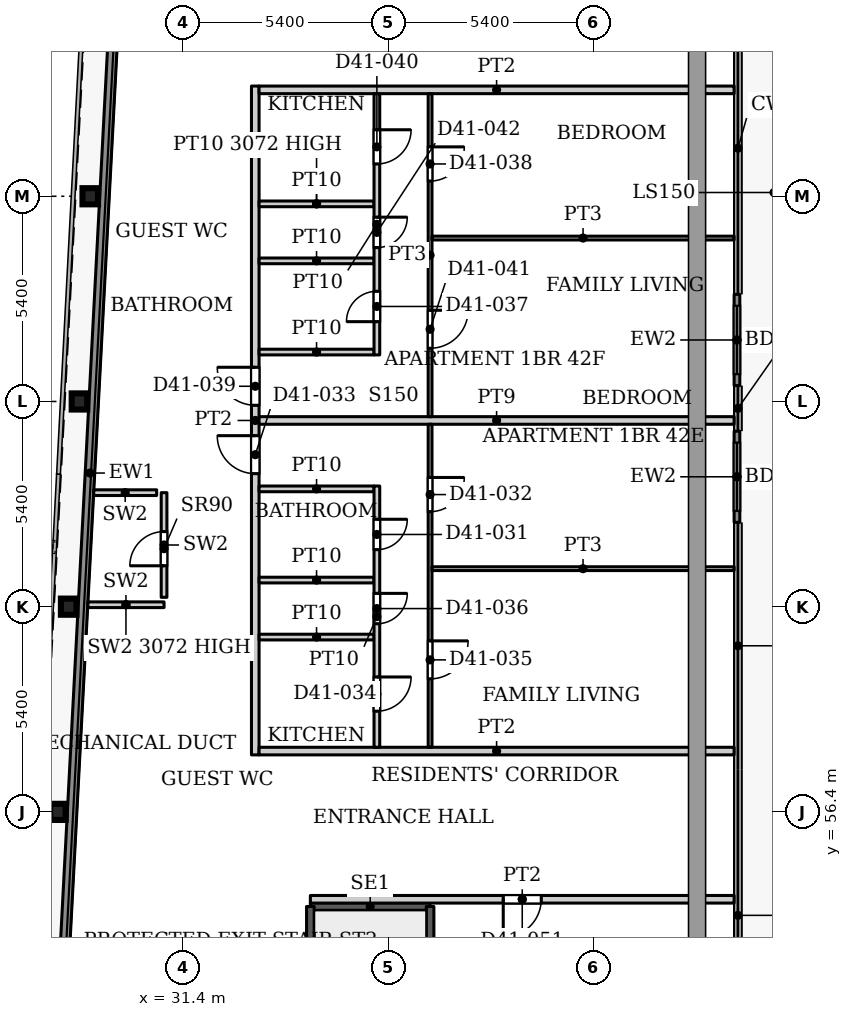
"""IFC4 building model, lengths in metres.
Left out: names, types, materials, properties, quantities, classifications, styles, units other than length and angle.
Written with IfcOpenShell. Run it as: python <this file> out.ifc"""

import sys

from ifc_helpers import new_model, si_unit, direction, frame, frame_2d, origin, origin_2d, place, context, subcontext, project, spatial, rectangle, i_section, extrude, source, transform, mapped, element, fill, save


model = new_model("IFC4")
c1 = context("Model", 3, precision=1e-05, world=origin(), true_north=direction((0.0, 1.0)))
c2 = subcontext(c1, "Body", "Model", "MODEL_VIEW")
j1 = project(units=[si_unit("LENGTHUNIT", "METRE"), si_unit("PLANEANGLEUNIT", "RADIAN")], contexts=[c1])
p1 = place(None, origin())
s1 = spatial("IfcSite", under=j1, at=p1, CompositionType="ELEMENT")
p2 = place(p1, origin())
s2 = spatial("IfcBuilding", under=s1, at=p2, CompositionType="ELEMENT")
p3 = place(p2, frame((0.0, 0.0, 179.9)))
s3 = spatial("IfcBuildingStorey", under=s2, at=p3, CompositionType="ELEMENT", Elevation=179.9)
for number, where, z_axis, x_axis in (
    (1, (28.106, 56.4, 0.0), (0.0, 0.0, 1.0), (1.0, 0.0, 0.0)),
    (2, (28.39, 61.8, 0.0), (0.0, 0.0, 1.0), (1.0, 0.0, 0.0)),
    (3, (28.674, 67.2, 0.0), (0.0, 0.0, 1.0), (1.0, 0.0, 0.0)),
    (4, (28.958, 72.6, 0.0), (0.0, 0.0, 1.0), (1.0, 0.0, 0.0)),
):
    element("IfcColumn", number, at=place(p3, frame(where, z_axis=z_axis, x_axis=x_axis)), inside=s3, PredefinedType="COLUMN", context=c2, shape_type="SweptSolid", body=[
        extrude(i_section(OverallWidth=0.409, OverallDepth=0.425, WebThickness=0.033, FlangeThickness=0.052, FilletRadius=0.013, at=origin_2d()), origin(), (0.0, 0.0, 1.0), 3.9),
    ])
p4 = place(p3, frame((27.195, 31.969, 0.0), z_axis=(0.0, 0.0, 1.0), x_axis=(0.052554995867, 0.998618031286, 0.0)))
e5 = element("IfcWall", 5, at=p4, inside=s3, PredefinedType="SOLIDWALL", context=c2, shape_type="SweptSolid", body=[
    extrude(rectangle(XDim=66.787, YDim=0.25, at=frame_2d((33.394, 0.0))), origin(), (0.0, 0.0, 1.0), 3.75),
])
p5 = place(p3, frame((45.975, 70.018, 0.0), z_axis=(0.0, 0.0, 1.0), x_axis=(0.0, -1.0, 0.0)))
e6 = element("IfcWall", 6, at=p5, inside=s3, PredefinedType="SOLIDWALL", context=c2, shape_type="SweptSolid", body=[
    extrude(rectangle(XDim=2.4, YDim=0.15, at=frame_2d((1.2, 0.0))), origin(), (0.0, 0.0, 1.0), 3.75),
])
p6 = place(p5, frame((0.3, 0.0, 0.0)))
e7 = element("IfcOpeningElement", 7, at=p6, cuts=e6, PredefinedType="OPENING", context=c2, shape_type="SweptSolid", body=[
    extrude(rectangle(XDim=1.8, YDim=2.4, at=frame_2d((0.9, 1.2))), frame((0.0, 0.085, 0.0), z_axis=(0.0, -1.0, 0.0), x_axis=(1.0, 0.0, 0.0)), (0.0, 0.0, 1.0), 0.17),
])
p7 = place(p3, frame((45.975, 66.418, 0.0), z_axis=(0.0, 0.0, 1.0), x_axis=(0.0, -1.0, 0.0)))
e8 = element("IfcWall", 8, at=p7, inside=s3, PredefinedType="SOLIDWALL", context=c2, shape_type="SweptSolid", body=[
    extrude(rectangle(XDim=2.4, YDim=0.15, at=frame_2d((1.2, 0.0))), origin(), (0.0, 0.0, 1.0), 3.75),
])
p8 = place(p7, frame((0.3, 0.0, 0.0)))
e9 = element("IfcOpeningElement", 9, at=p8, cuts=e8, PredefinedType="OPENING", context=c2, shape_type="SweptSolid", body=[
    extrude(rectangle(XDim=1.8, YDim=2.4, at=frame_2d((0.9, 1.2))), frame((0.0, 0.085, 0.0), z_axis=(0.0, -1.0, 0.0), x_axis=(1.0, 0.0, 0.0)), (0.0, 0.0, 1.0), 0.17),
])
p9 = place(p3, frame((34.75, 53.91, 0.0), z_axis=(0.0, 0.0, 1.0), x_axis=(1.0, 0.0, 0.0)))
e10 = element("IfcWall", 10, at=p9, inside=s3, PredefinedType="SHEAR", context=c2, shape_type="SweptSolid", body=[
    extrude(rectangle(XDim=3.15, YDim=0.2, at=frame_2d((1.575, 0.0))), origin(), (0.0, 0.0, 1.0), 3.9),
])
p10 = place(p3, frame((34.75, 47.5, 0.0), z_axis=(0.0, 0.0, 1.0), x_axis=(0.0, 1.0, 0.0)))
e11 = element("IfcWall", 11, at=p10, inside=s3, PredefinedType="SHEAR", context=c2, shape_type="SweptSolid", body=[
    extrude(rectangle(XDim=6.41, YDim=0.2, at=frame_2d((3.205, 0.0))), origin(), (0.0, 0.0, 1.0), 3.9),
])
p11 = place(p3, frame((37.9, 44.75, 0.0), z_axis=(0.0, 0.0, 1.0), x_axis=(0.0, 1.0, 0.0)))
e12 = element("IfcWall", 12, at=p11, inside=s3, PredefinedType="SHEAR", context=c2, shape_type="SweptSolid", body=[
    extrude(rectangle(XDim=9.16, YDim=0.2, at=frame_2d((4.58, 0.0))), origin(), (0.0, 0.0, 1.0), 3.9),
])
p12 = place(p3, frame((28.895, 61.851, 0.0), z_axis=(0.0, 0.0, 1.0), x_axis=(1.0, 0.0, 0.0)))
e13 = element("IfcWall", 13, at=p12, inside=s3, PredefinedType="PARTITIONING", context=c2, shape_type="SweptSolid", body=[
    extrude(rectangle(XDim=2.005, YDim=0.15, at=frame_2d((1.002, 0.0))), origin(), (0.0, 0.0, 1.0), 3.072),
])
p13 = place(p3, frame((30.9, 62.046, 0.0), z_axis=(0.0, 0.0, 1.0), x_axis=(0.0, 1.0, 0.0)))
e14 = element("IfcWall", 14, at=p13, inside=s3, PredefinedType="PARTITIONING", context=c2, shape_type="SweptSolid", body=[
    extrude(rectangle(XDim=2.754, YDim=0.15, at=frame_2d((1.377, 0.0))), origin(), (0.0, 0.0, 1.0), 3.9),
])
p14 = place(p13, frame((0.83, 0.0, 0.0)))
e15 = element("IfcOpeningElement", 15, at=p14, cuts=e14, PredefinedType="OPENING", context=c2, shape_type="SweptSolid", body=[
    extrude(rectangle(XDim=0.9, YDim=2.2, at=frame_2d((0.45, 1.1))), frame((0.0, 0.085, 0.0), z_axis=(0.0, -1.0, 0.0), x_axis=(1.0, 0.0, 0.0)), (0.0, 0.0, 1.0), 0.17),
])
p15 = place(p3, frame((29.05, 64.8, 0.0), z_axis=(0.0, 0.0, 1.0), x_axis=(1.0, 0.0, 0.0)))
e16 = element("IfcWall", 16, at=p15, inside=s3, PredefinedType="PARTITIONING", context=c2, shape_type="SweptSolid", body=[
    extrude(rectangle(XDim=1.655, YDim=0.15, at=frame_2d((0.828, 0.0))), origin(), (0.0, 0.0, 1.0), 3.9),
])
p16 = place(p3, frame((33.3, 57.9, 0.0), z_axis=(0.0, 0.0, 1.0), x_axis=(0.0, 1.0, 0.0)))
e17 = element("IfcWall", 17, at=p16, inside=s3, PredefinedType="PARTITIONING", context=c2, shape_type="SweptSolid", body=[
    extrude(rectangle(XDim=17.6, YDim=0.2, at=frame_2d((8.8, 0.0))), origin(), (0.0, 0.0, 1.0), 3.6),
])
p17 = place(p16, frame((7.4, 0.0, 0.0)))
e18 = element("IfcOpeningElement", 18, at=p17, cuts=e17, PredefinedType="OPENING", context=c2, shape_type="SweptSolid", body=[
    extrude(rectangle(XDim=1.0, YDim=2.1, at=frame_2d((0.5, 1.05))), frame((0.0, 0.11, 0.0), z_axis=(0.0, -1.0, 0.0), x_axis=(1.0, 0.0, 0.0)), (0.0, 0.0, 1.0), 0.22),
])
p18 = place(p16, frame((9.2, 0.0, 0.0)))
e19 = element("IfcOpeningElement", 19, at=p18, cuts=e17, PredefinedType="OPENING", context=c2, shape_type="SweptSolid", body=[
    extrude(rectangle(XDim=1.0, YDim=2.1, at=frame_2d((0.5, 1.05))), frame((0.0, 0.11, 0.0), z_axis=(0.0, -1.0, 0.0), x_axis=(1.0, 0.0, 0.0)), (0.0, 0.0, 1.0), 0.22),
])
p19 = place(p3, frame((33.4, 58.0, 0.0), z_axis=(0.0, 0.0, 1.0), x_axis=(1.0, 0.0, 0.0)))
e20 = element("IfcWall", 20, at=p19, inside=s3, PredefinedType="PARTITIONING", context=c2, shape_type="SweptSolid", body=[
    extrude(rectangle(XDim=12.5, YDim=0.2, at=frame_2d((6.25, 0.0))), origin(), (0.0, 0.0, 1.0), 3.6),
])
for number, where, z_axis, x_axis in (
    (21, (33.4, 61.0, 0.0), (0.0, 0.0, 1.0), (1.0, 0.0, 0.0)),
    (22, (33.4, 62.5, 0.0), (0.0, 0.0, 1.0), (1.0, 0.0, 0.0)),
    (23, (33.4, 64.9, 0.0), (0.0, 0.0, 1.0), (1.0, 0.0, 0.0)),
):
    element("IfcWall", number, at=place(p3, frame(where, z_axis=z_axis, x_axis=x_axis)), inside=s3, PredefinedType="PARTITIONING", context=c2, shape_type="SweptSolid", body=[
        extrude(rectangle(XDim=3.025, YDim=0.15, at=frame_2d((1.513, 0.0))), origin(), (0.0, 0.0, 1.0), 3.6),
    ])
p20 = place(p3, frame((33.4, 66.7, 0.0), z_axis=(0.0, 0.0, 1.0), x_axis=(1.0, 0.0, 0.0)))
e24 = element("IfcWall", 24, at=p20, inside=s3, PredefinedType="PARTITIONING", context=c2, shape_type="SweptSolid", body=[
    extrude(rectangle(XDim=12.5, YDim=0.2, at=frame_2d((6.25, 0.0))), origin(), (0.0, 0.0, 1.0), 3.6),
])
for number, where, z_axis, x_axis in (
    (25, (33.4, 68.5, 0.0), (0.0, 0.0, 1.0), (1.0, 0.0, 0.0)),
    (26, (33.4, 70.9, 0.0), (0.0, 0.0, 1.0), (1.0, 0.0, 0.0)),
):
    element("IfcWall", number, at=place(p3, frame(where, z_axis=z_axis, x_axis=x_axis)), inside=s3, PredefinedType="PARTITIONING", context=c2, shape_type="SweptSolid", body=[
        extrude(rectangle(XDim=3.025, YDim=0.15, at=frame_2d((1.513, 0.0))), origin(), (0.0, 0.0, 1.0), 3.6),
    ])
p21 = place(p3, frame((33.4, 72.4, 0.0), z_axis=(0.0, 0.0, 1.0), x_axis=(1.0, 0.0, 0.0)))
e27 = element("IfcWall", 27, at=p21, inside=s3, PredefinedType="PARTITIONING", context=c2, shape_type="SweptSolid", body=[
    extrude(rectangle(XDim=3.025, YDim=0.15, at=frame_2d((1.513, 0.0))), origin(), (0.0, 0.0, 1.0), 3.072),
])
p22 = place(p3, frame((33.4, 75.4, 0.0), z_axis=(0.0, 0.0, 1.0), x_axis=(1.0, 0.0, 0.0)))
e28 = element("IfcWall", 28, at=p22, inside=s3, PredefinedType="PARTITIONING", context=c2, shape_type="SweptSolid", body=[
    extrude(rectangle(XDim=12.5, YDim=0.2, at=frame_2d((6.25, 0.0))), origin(), (0.0, 0.0, 1.0), 3.6),
])
p23 = place(p3, frame((34.75, 54.1, 0.0), z_axis=(0.0, 0.0, 1.0), x_axis=(1.0, 0.0, 0.0)))
e29 = element("IfcWall", 29, at=p23, inside=s3, PredefinedType="PARTITIONING", context=c2, shape_type="SweptSolid", body=[
    extrude(rectangle(XDim=11.15, YDim=0.2, at=frame_2d((5.575, 0.0))), origin(), (0.0, 0.0, 1.0), 3.6),
])
p24 = place(p23, frame((5.075, 0.0, 0.0)))
e30 = element("IfcOpeningElement", 30, at=p24, cuts=e29, PredefinedType="OPENING", context=c2, shape_type="SweptSolid", body=[
    extrude(rectangle(XDim=1.0, YDim=2.1, at=frame_2d((0.5, 1.05))), frame((0.0, 0.11, 0.0), z_axis=(0.0, -1.0, 0.0), x_axis=(1.0, 0.0, 0.0)), (0.0, 0.0, 1.0), 0.22),
])
p25 = place(p3, frame((36.5, 58.1, 0.0), z_axis=(0.0, 0.0, 1.0), x_axis=(0.0, 1.0, 0.0)))
e31 = element("IfcWall", 31, at=p25, inside=s3, PredefinedType="PARTITIONING", context=c2, shape_type="SweptSolid", body=[
    extrude(rectangle(XDim=6.875, YDim=0.15, at=frame_2d((3.438, 0.0))), origin(), (0.0, 0.0, 1.0), 3.6),
])
p26 = place(p25, frame((5.2, 0.0, 0.0)))
e32 = element("IfcOpeningElement", 32, at=p26, cuts=e31, PredefinedType="OPENING", context=c2, shape_type="SweptSolid", body=[
    extrude(rectangle(XDim=0.8, YDim=2.1, at=frame_2d((0.4, 1.05))), frame((0.0, 0.085, 0.0), z_axis=(0.0, -1.0, 0.0), x_axis=(1.0, 0.0, 0.0)), (0.0, 0.0, 1.0), 0.17),
])
p27 = place(p25, frame((0.95, 0.0, 0.0)))
e33 = element("IfcOpeningElement", 33, at=p27, cuts=e31, PredefinedType="OPENING", context=c2, shape_type="SweptSolid", body=[
    extrude(rectangle(XDim=0.9, YDim=2.1, at=frame_2d((0.45, 1.05))), frame((0.0, 0.085, 0.0), z_axis=(0.0, -1.0, 0.0), x_axis=(1.0, 0.0, 0.0)), (0.0, 0.0, 1.0), 0.17),
])
p28 = place(p25, frame((3.25, 0.0, 0.0)))
e34 = element("IfcOpeningElement", 34, at=p28, cuts=e31, PredefinedType="OPENING", context=c2, shape_type="SweptSolid", body=[
    extrude(rectangle(XDim=0.8, YDim=2.1, at=frame_2d((0.4, 1.05))), frame((0.0, 0.085, 0.0), z_axis=(0.0, -1.0, 0.0), x_axis=(1.0, 0.0, 0.0)), (0.0, 0.0, 1.0), 0.17),
])
p29 = place(p3, frame((36.5, 68.425, 0.0), z_axis=(0.0, 0.0, 1.0), x_axis=(0.0, 1.0, 0.0)))
e35 = element("IfcWall", 35, at=p29, inside=s3, PredefinedType="PARTITIONING", context=c2, shape_type="SweptSolid", body=[
    extrude(rectangle(XDim=6.875, YDim=0.15, at=frame_2d((3.438, 0.0))), origin(), (0.0, 0.0, 1.0), 3.6),
])
p30 = place(p29, frame((0.875, 0.0, 0.0)))
e36 = element("IfcOpeningElement", 36, at=p30, cuts=e35, PredefinedType="OPENING", context=c2, shape_type="SweptSolid", body=[
    extrude(rectangle(XDim=0.8, YDim=2.1, at=frame_2d((0.4, 1.05))), frame((0.0, 0.085, 0.0), z_axis=(0.0, -1.0, 0.0), x_axis=(1.0, 0.0, 0.0)), (0.0, 0.0, 1.0), 0.17),
])
p31 = place(p29, frame((5.025, 0.0, 0.0)))
e37 = element("IfcOpeningElement", 37, at=p31, cuts=e35, PredefinedType="OPENING", context=c2, shape_type="SweptSolid", body=[
    extrude(rectangle(XDim=0.9, YDim=2.1, at=frame_2d((0.45, 1.05))), frame((0.0, 0.085, 0.0), z_axis=(0.0, -1.0, 0.0), x_axis=(1.0, 0.0, 0.0)), (0.0, 0.0, 1.0), 0.17),
])
p32 = place(p29, frame((2.825, 0.0, 0.0)))
e38 = element("IfcOpeningElement", 38, at=p32, cuts=e35, PredefinedType="OPENING", context=c2, shape_type="SweptSolid", body=[
    extrude(rectangle(XDim=0.8, YDim=2.1, at=frame_2d((0.4, 1.05))), frame((0.0, 0.085, 0.0), z_axis=(0.0, -1.0, 0.0), x_axis=(1.0, 0.0, 0.0)), (0.0, 0.0, 1.0), 0.17),
])
p33 = place(p3, frame((37.9, 58.1, 0.0), z_axis=(0.0, 0.0, 1.0), x_axis=(0.0, 1.0, 0.0)))
e39 = element("IfcWall", 39, at=p33, inside=s3, PredefinedType="PARTITIONING", context=c2, shape_type="SweptSolid", body=[
    extrude(rectangle(XDim=8.5, YDim=0.1, at=frame_2d((4.25, 0.0))), origin(), (0.0, 0.0, 1.0), 3.6),
])
p34 = place(p33, frame((6.2, 0.0, 0.0)))
e40 = element("IfcOpeningElement", 40, at=p34, cuts=e39, PredefinedType="OPENING", context=c2, shape_type="SweptSolid", body=[
    extrude(rectangle(XDim=0.9, YDim=2.1, at=frame_2d((0.45, 1.05))), frame((0.0, 0.06, 0.0), z_axis=(0.0, -1.0, 0.0), x_axis=(1.0, 0.0, 0.0)), (0.0, 0.0, 1.0), 0.12),
])
p35 = place(p33, frame((1.8, 0.0, 0.0)))
e41 = element("IfcOpeningElement", 41, at=p35, cuts=e39, PredefinedType="OPENING", context=c2, shape_type="SweptSolid", body=[
    extrude(rectangle(XDim=1.0, YDim=2.1, at=frame_2d((0.5, 1.05))), frame((0.0, 0.06, 0.0), z_axis=(0.0, -1.0, 0.0), x_axis=(1.0, 0.0, 0.0)), (0.0, 0.0, 1.0), 0.12),
])
p36 = place(p3, frame((37.9, 66.8, 0.0), z_axis=(0.0, 0.0, 1.0), x_axis=(0.0, 1.0, 0.0)))
e42 = element("IfcWall", 42, at=p36, inside=s3, PredefinedType="PARTITIONING", context=c2, shape_type="SweptSolid", body=[
    extrude(rectangle(XDim=8.5, YDim=0.1, at=frame_2d((4.25, 0.0))), origin(), (0.0, 0.0, 1.0), 3.6),
])
p37 = place(p36, frame((6.2, 0.0, 0.0)))
e43 = element("IfcOpeningElement", 43, at=p37, cuts=e42, PredefinedType="OPENING", context=c2, shape_type="SweptSolid", body=[
    extrude(rectangle(XDim=0.9, YDim=2.1, at=frame_2d((0.45, 1.05))), frame((0.0, 0.06, 0.0), z_axis=(0.0, -1.0, 0.0), x_axis=(1.0, 0.0, 0.0)), (0.0, 0.0, 1.0), 0.12),
])
p38 = place(p36, frame((1.8, 0.0, 0.0)))
e44 = element("IfcOpeningElement", 44, at=p38, cuts=e42, PredefinedType="OPENING", context=c2, shape_type="SweptSolid", body=[
    extrude(rectangle(XDim=1.0, YDim=2.1, at=frame_2d((0.5, 1.05))), frame((0.0, 0.06, 0.0), z_axis=(0.0, -1.0, 0.0), x_axis=(1.0, 0.0, 0.0)), (0.0, 0.0, 1.0), 0.12),
])
for number, where, z_axis, x_axis in (
    (45, (37.95, 62.8, 0.0), (0.0, 0.0, 1.0), (1.0, 0.0, 0.0)),
    (46, (37.95, 71.5, 0.0), (0.0, 0.0, 1.0), (1.0, 0.0, 0.0)),
):
    element("IfcWall", number, at=place(p3, frame(where, z_axis=z_axis, x_axis=x_axis)), inside=s3, PredefinedType="PARTITIONING", context=c2, shape_type="SweptSolid", body=[
        extrude(rectangle(XDim=7.95, YDim=0.1, at=frame_2d((3.975, 0.0))), origin(), (0.0, 0.0, 1.0), 3.6),
    ])
m1 = source(origin(), c2, "Body", "SweptSolid", [
    extrude(rectangle(XDim=1.8, YDim=2.4, at=frame_2d((0.9, 1.2))), frame((0.0, 0.025, 0.0), z_axis=(0.0, -1.0, 0.0), x_axis=(1.0, 0.0, 0.0)), (0.0, 0.0, 1.0), 0.05),
])
p39 = place(p6, origin())
e47 = element("IfcDoor", 47, at=p39, inside=s3, OperationType="SLIDING_TO_LEFT", PredefinedType="DOOR", context=c2, shape_type="MappedRepresentation", body=[
    mapped(m1, transform((0.0, 0.0, 0.0), x_axis=(1.0, 0.0, 0.0), y_axis=(0.0, 1.0, 0.0), z_axis=(0.0, 0.0, 1.0), scale=1.0)),
])
fill(e7, e47)
p40 = place(p8, origin())
e48 = element("IfcDoor", 48, at=p40, inside=s3, OperationType="SLIDING_TO_LEFT", PredefinedType="DOOR", context=c2, shape_type="MappedRepresentation", body=[
    mapped(m1, transform((0.0, 0.0, 0.0), x_axis=(1.0, 0.0, 0.0), y_axis=(0.0, 1.0, 0.0), z_axis=(0.0, 0.0, 1.0), scale=1.0)),
])
fill(e9, e48)
m2 = source(origin(), c2, "Body", "SweptSolid", [
    extrude(rectangle(XDim=0.9, YDim=2.2, at=frame_2d((0.45, 1.1))), frame((0.0, 0.025, 0.0), z_axis=(0.0, -1.0, 0.0), x_axis=(1.0, 0.0, 0.0)), (0.0, 0.0, 1.0), 0.05),
])
p41 = place(p14, origin())
e49 = element("IfcDoor", 49, at=p41, inside=s3, OperationType="SINGLE_SWING_LEFT", PredefinedType="DOOR", context=c2, shape_type="MappedRepresentation", body=[
    mapped(m2, transform((0.0, 0.0, 0.0), x_axis=(1.0, 0.0, 0.0), y_axis=(0.0, 1.0, 0.0), z_axis=(0.0, 0.0, 1.0), scale=1.0)),
])
fill(e15, e49)
m3 = source(origin(), c2, "Body", "SweptSolid", [
    extrude(rectangle(XDim=0.8, YDim=2.1, at=frame_2d((0.4, 1.05))), frame((0.0, 0.025, 0.0), z_axis=(0.0, -1.0, 0.0), x_axis=(1.0, 0.0, 0.0)), (0.0, 0.0, 1.0), 0.05),
])
p42 = place(p26, origin())
e50 = element("IfcDoor", 50, at=p42, inside=s3, OperationType="SINGLE_SWING_RIGHT", PredefinedType="DOOR", context=c2, shape_type="MappedRepresentation", body=[
    mapped(m3, transform((0.0, 0.0, 0.0), x_axis=(1.0, 0.0, 0.0), y_axis=(0.0, 1.0, 0.0), z_axis=(0.0, 0.0, 1.0), scale=1.0)),
])
fill(e32, e50)
m4 = source(origin(), c2, "Body", "SweptSolid", [
    extrude(rectangle(XDim=0.9, YDim=2.1, at=frame_2d((0.45, 1.05))), frame((0.0, 0.025, 0.0), z_axis=(0.0, -1.0, 0.0), x_axis=(1.0, 0.0, 0.0)), (0.0, 0.0, 1.0), 0.05),
])
p43 = place(p34, origin())
e51 = element("IfcDoor", 51, at=p43, inside=s3, OperationType="SINGLE_SWING_RIGHT", PredefinedType="DOOR", context=c2, shape_type="MappedRepresentation", body=[
    mapped(m4, transform((0.0, 0.0, 0.0), x_axis=(1.0, 0.0, 0.0), y_axis=(0.0, 1.0, 0.0), z_axis=(0.0, 0.0, 1.0), scale=1.0)),
])
fill(e40, e51)
m5 = source(origin(), c2, "Body", "SweptSolid", [
    extrude(rectangle(XDim=1.0, YDim=2.1, at=frame_2d((0.5, 1.05))), frame((0.0, 0.025, 0.0), z_axis=(0.0, -1.0, 0.0), x_axis=(1.0, 0.0, 0.0)), (0.0, 0.0, 1.0), 0.05),
])
p44 = place(p17, origin())
e52 = element("IfcDoor", 52, at=p44, inside=s3, OperationType="SINGLE_SWING_LEFT", PredefinedType="DOOR", context=c2, shape_type="MappedRepresentation", body=[
    mapped(m5, transform((0.0, 0.0, 0.0), x_axis=(1.0, 0.0, 0.0), y_axis=(0.0, 1.0, 0.0), z_axis=(0.0, 0.0, 1.0), scale=1.0)),
])
fill(e18, e52)
p45 = place(p27, origin())
e53 = element("IfcDoor", 53, at=p45, inside=s3, OperationType="SINGLE_SWING_RIGHT", PredefinedType="DOOR", context=c2, shape_type="MappedRepresentation", body=[
    mapped(m4, transform((0.0, 0.0, 0.0), x_axis=(1.0, 0.0, 0.0), y_axis=(0.0, 1.0, 0.0), z_axis=(0.0, 0.0, 1.0), scale=1.0)),
])
fill(e33, e53)
m6 = source(origin(), c2, "Body", "SweptSolid", [
    extrude(rectangle(XDim=1.0, YDim=2.1, at=frame_2d((0.5, 1.05))), frame((0.0, 0.025, 0.0), z_axis=(0.0, -1.0, 0.0), x_axis=(1.0, 0.0, 0.0)), (0.0, 0.0, 1.0), 0.05),
])
p46 = place(p35, origin())
e54 = element("IfcDoor", 54, at=p46, inside=s3, OperationType="SINGLE_SWING_RIGHT", PredefinedType="DOOR", context=c2, shape_type="MappedRepresentation", body=[
    mapped(m6, transform((0.0, 0.0, 0.0), x_axis=(1.0, 0.0, 0.0), y_axis=(0.0, 1.0, 0.0), z_axis=(0.0, 0.0, 1.0), scale=1.0)),
])
fill(e41, e54)
p47 = place(p28, origin())
e55 = element("IfcDoor", 55, at=p47, inside=s3, OperationType="SINGLE_SWING_RIGHT", PredefinedType="DOOR", context=c2, shape_type="MappedRepresentation", body=[
    mapped(m3, transform((0.0, 0.0, 0.0), x_axis=(1.0, 0.0, 0.0), y_axis=(0.0, 1.0, 0.0), z_axis=(0.0, 0.0, 1.0), scale=1.0)),
])
fill(e34, e55)
p48 = place(p30, origin())
e56 = element("IfcDoor", 56, at=p48, inside=s3, OperationType="SINGLE_SWING_LEFT", PredefinedType="DOOR", context=c2, shape_type="MappedRepresentation", body=[
    mapped(m3, transform((0.0, 0.0, 0.0), x_axis=(1.0, 0.0, 0.0), y_axis=(0.0, 1.0, 0.0), z_axis=(0.0, 0.0, 1.0), scale=1.0)),
])
fill(e36, e56)
p49 = place(p37, origin())
e57 = element("IfcDoor", 57, at=p49, inside=s3, OperationType="SINGLE_SWING_RIGHT", PredefinedType="DOOR", context=c2, shape_type="MappedRepresentation", body=[
    mapped(m4, transform((0.0, 0.0, 0.0), x_axis=(1.0, 0.0, 0.0), y_axis=(0.0, 1.0, 0.0), z_axis=(0.0, 0.0, 1.0), scale=1.0)),
])
fill(e43, e57)
p50 = place(p18, origin())
e58 = element("IfcDoor", 58, at=p50, inside=s3, OperationType="SINGLE_SWING_LEFT", PredefinedType="DOOR", context=c2, shape_type="MappedRepresentation", body=[
    mapped(m5, transform((0.0, 0.0, 0.0), x_axis=(1.0, 0.0, 0.0), y_axis=(0.0, 1.0, 0.0), z_axis=(0.0, 0.0, 1.0), scale=1.0)),
])
fill(e19, e58)
p51 = place(p31, origin())
e59 = element("IfcDoor", 59, at=p51, inside=s3, OperationType="SINGLE_SWING_RIGHT", PredefinedType="DOOR", context=c2, shape_type="MappedRepresentation", body=[
    mapped(m4, transform((0.0, 0.0, 0.0), x_axis=(1.0, 0.0, 0.0), y_axis=(0.0, 1.0, 0.0), z_axis=(0.0, 0.0, 1.0), scale=1.0)),
])
fill(e37, e59)
p52 = place(p38, origin())
e60 = element("IfcDoor", 60, at=p52, inside=s3, OperationType="SINGLE_SWING_RIGHT", PredefinedType="DOOR", context=c2, shape_type="MappedRepresentation", body=[
    mapped(m6, transform((0.0, 0.0, 0.0), x_axis=(1.0, 0.0, 0.0), y_axis=(0.0, 1.0, 0.0), z_axis=(0.0, 0.0, 1.0), scale=1.0)),
])
fill(e44, e60)
p53 = place(p32, origin())
e61 = element("IfcDoor", 61, at=p53, inside=s3, OperationType="SINGLE_SWING_RIGHT", PredefinedType="DOOR", context=c2, shape_type="MappedRepresentation", body=[
    mapped(m3, transform((0.0, 0.0, 0.0), x_axis=(1.0, 0.0, 0.0), y_axis=(0.0, 1.0, 0.0), z_axis=(0.0, 0.0, 1.0), scale=1.0)),
])
fill(e38, e61)
m7 = source(origin(), c2, "Body", "SweptSolid", [
    extrude(rectangle(XDim=1.0, YDim=2.1, at=frame_2d((0.5, 1.05))), frame((0.0, 0.025, 0.0), z_axis=(0.0, -1.0, 0.0), x_axis=(1.0, 0.0, 0.0)), (0.0, 0.0, 1.0), 0.05),
])
p54 = place(p24, origin())
e62 = element("IfcDoor", 62, at=p54, inside=s3, OperationType="SINGLE_SWING_RIGHT", PredefinedType="DOOR", context=c2, shape_type="MappedRepresentation", body=[
    mapped(m7, transform((0.0, 0.0, 0.0), x_axis=(1.0, 0.0, 0.0), y_axis=(0.0, 1.0, 0.0), z_axis=(0.0, 0.0, 1.0), scale=1.0)),
])
fill(e30, e62)
save(model, sys.argv[1])
